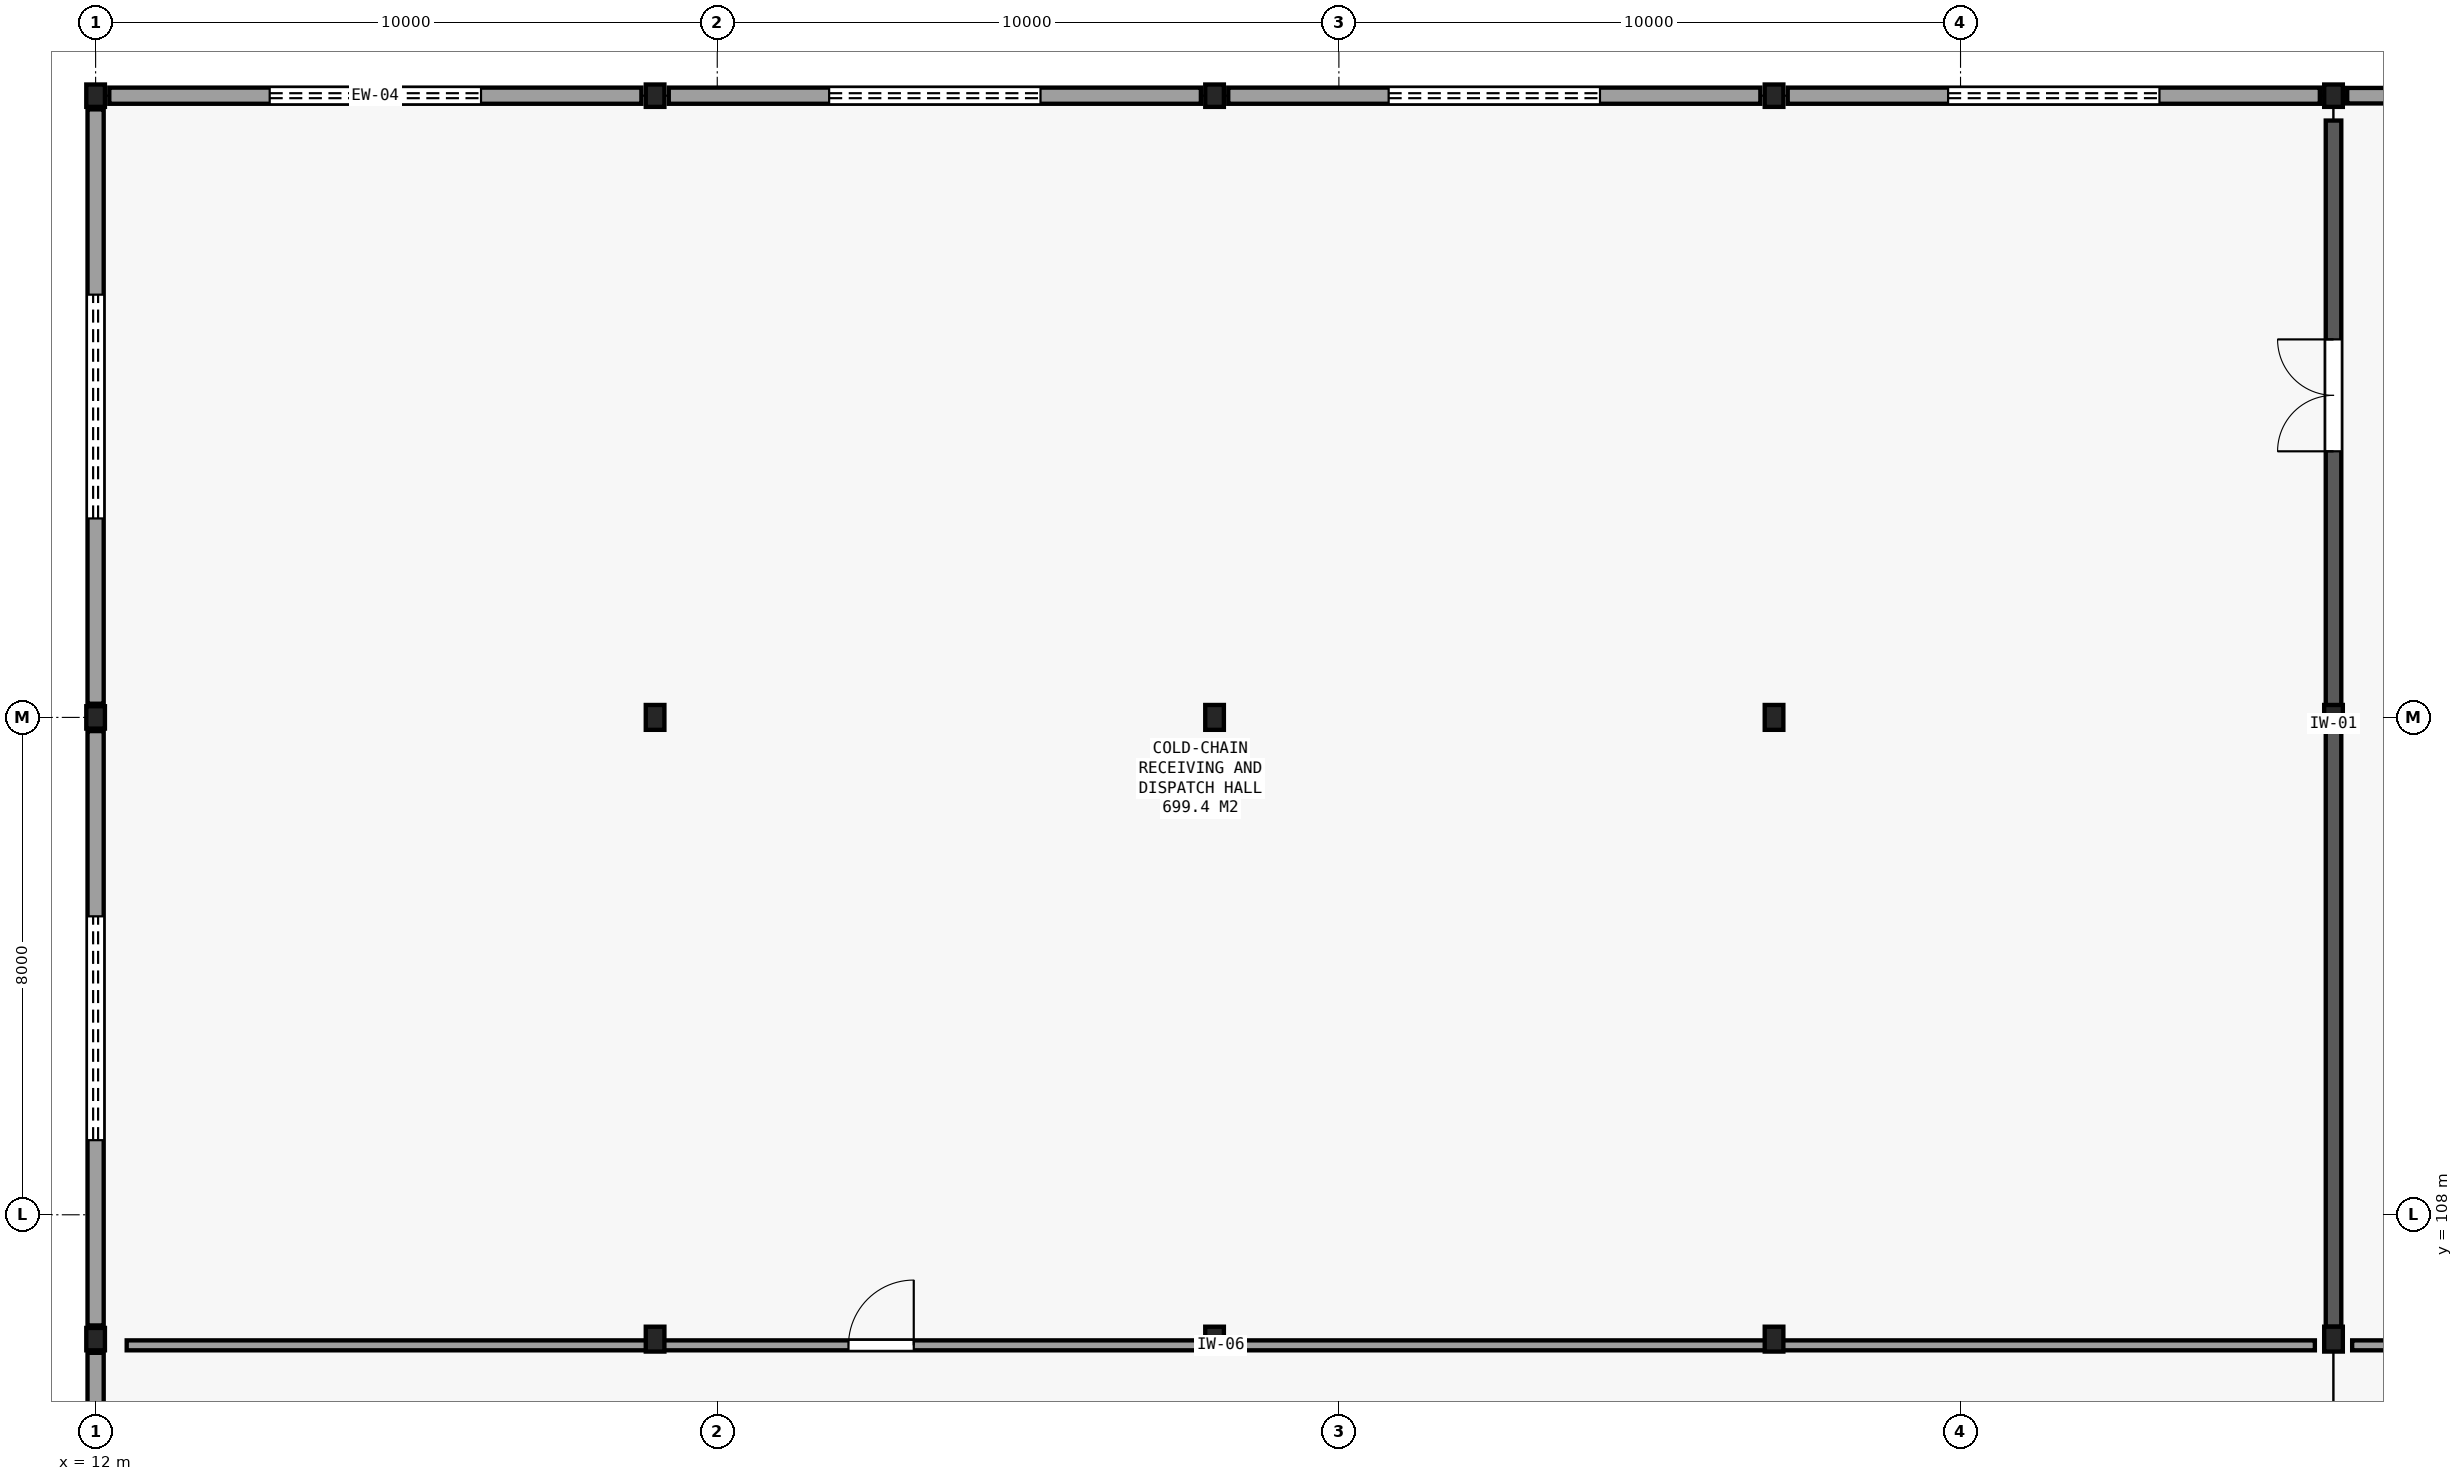
"""IFC4 building model, lengths in metres.
Left out: names, types, materials, properties, quantities, classifications, styles, units other than length and angle.
Written with IfcOpenShell. Run it as: python <this file> out.ifc"""

import sys

from ifc_helpers import new_model, si_unit, direction, frame, frame_2d, origin, origin_2d, place, context, subcontext, project, spatial, rectangle, i_section, extrude, element, fill, save


model = new_model("IFC4")
c1 = context("Model", 3, precision=1e-05, world=origin(), true_north=direction((0.0, 1.0)))
c2 = subcontext(c1, "Body", "Model", "MODEL_VIEW")
j1 = project(units=[si_unit("LENGTHUNIT", "METRE"), si_unit("PLANEANGLEUNIT", "RADIAN")], contexts=[c1])
p1 = place(None, origin())
s1 = spatial("IfcSite", under=j1, at=p1, CompositionType="ELEMENT")
p2 = place(p1, origin())
s2 = spatial("IfcBuilding", under=s1, at=p2, CompositionType="ELEMENT")
p3 = place(p2, origin())
s3 = spatial("IfcBuildingStorey", under=s2, at=p3, CompositionType="ELEMENT", Elevation=0.0)
for number, where, z_axis, x_axis in (
    (1, (12.0, 106.0, 0.0), (0.0, 0.0, 1.0), (1.0, 0.0, 0.0)),
    (2, (12.0, 116.0, 0.0), (0.0, 0.0, 1.0), (1.0, 0.0, 0.0)),
    (3, (12.0, 126.0, 0.0), (0.0, 0.0, 1.0), (1.0, 0.0, 0.0)),
):
    element("IfcColumn", number, at=place(p3, frame(where, z_axis=z_axis, x_axis=x_axis)), inside=s3, PredefinedType="COLUMN", context=c2, shape_type="SweptSolid", body=[
        extrude(i_section(OverallWidth=0.3, OverallDepth=0.36, WebThickness=0.012, FlangeThickness=0.022, FilletRadius=0.027, at=origin_2d()), origin(), (0.0, 0.0, 1.0), 5.4),
    ])
for number, where, z_axis, x_axis in (
    (4, (21.0, 106.0, 0.0), (0.0, 0.0, 1.0), (1.0, 0.0, 0.0)),
    (5, (21.0, 116.0, 0.0), (0.0, 0.0, 1.0), (1.0, 0.0, 0.0)),
):
    element("IfcColumn", number, at=place(p3, frame(where, z_axis=z_axis, x_axis=x_axis)), inside=s3, PredefinedType="COLUMN", context=c2, shape_type="SweptSolid", body=[
        extrude(i_section(OverallWidth=0.3, OverallDepth=0.4, WebThickness=0.013, FlangeThickness=0.024, FilletRadius=0.027, at=origin_2d()), origin(), (0.0, 0.0, 1.0), 5.4),
    ])
p4 = place(p3, frame((21.0, 126.0, 0.0), z_axis=(0.0, 0.0, 1.0), x_axis=(1.0, 0.0, 0.0)))
e6 = element("IfcColumn", 6, at=p4, inside=s3, PredefinedType="COLUMN", context=c2, shape_type="SweptSolid", body=[
    extrude(i_section(OverallWidth=0.3, OverallDepth=0.36, WebThickness=0.012, FlangeThickness=0.022, FilletRadius=0.027, at=origin_2d()), origin(), (0.0, 0.0, 1.0), 5.4),
])
for number, where, z_axis, x_axis in (
    (7, (30.0, 106.0, 0.0), (0.0, 0.0, 1.0), (1.0, 0.0, 0.0)),
    (8, (30.0, 116.0, 0.0), (0.0, 0.0, 1.0), (1.0, 0.0, 0.0)),
):
    element("IfcColumn", number, at=place(p3, frame(where, z_axis=z_axis, x_axis=x_axis)), inside=s3, PredefinedType="COLUMN", context=c2, shape_type="SweptSolid", body=[
        extrude(i_section(OverallWidth=0.3, OverallDepth=0.4, WebThickness=0.013, FlangeThickness=0.024, FilletRadius=0.027, at=origin_2d()), origin(), (0.0, 0.0, 1.0), 5.4),
    ])
p5 = place(p3, frame((30.0, 126.0, 0.0), z_axis=(0.0, 0.0, 1.0), x_axis=(1.0, 0.0, 0.0)))
e9 = element("IfcColumn", 9, at=p5, inside=s3, PredefinedType="COLUMN", context=c2, shape_type="SweptSolid", body=[
    extrude(i_section(OverallWidth=0.3, OverallDepth=0.36, WebThickness=0.012, FlangeThickness=0.022, FilletRadius=0.027, at=origin_2d()), origin(), (0.0, 0.0, 1.0), 5.4),
])
for number, where, z_axis, x_axis in (
    (10, (39.0, 106.0, 0.0), (0.0, 0.0, 1.0), (1.0, 0.0, 0.0)),
    (11, (39.0, 116.0, 0.0), (0.0, 0.0, 1.0), (1.0, 0.0, 0.0)),
):
    element("IfcColumn", number, at=place(p3, frame(where, z_axis=z_axis, x_axis=x_axis)), inside=s3, PredefinedType="COLUMN", context=c2, shape_type="SweptSolid", body=[
        extrude(i_section(OverallWidth=0.3, OverallDepth=0.4, WebThickness=0.013, FlangeThickness=0.024, FilletRadius=0.027, at=origin_2d()), origin(), (0.0, 0.0, 1.0), 5.4),
    ])
p6 = place(p3, frame((39.0, 126.0, 0.0), z_axis=(0.0, 0.0, 1.0), x_axis=(1.0, 0.0, 0.0)))
e12 = element("IfcColumn", 12, at=p6, inside=s3, PredefinedType="COLUMN", context=c2, shape_type="SweptSolid", body=[
    extrude(i_section(OverallWidth=0.3, OverallDepth=0.36, WebThickness=0.012, FlangeThickness=0.022, FilletRadius=0.027, at=origin_2d()), origin(), (0.0, 0.0, 1.0), 5.4),
])
for number, where, z_axis, x_axis in (
    (13, (48.0, 106.0, 0.0), (0.0, 0.0, 1.0), (1.0, 0.0, 0.0)),
    (14, (48.0, 116.0, 0.0), (0.0, 0.0, 1.0), (1.0, 0.0, 0.0)),
):
    element("IfcColumn", number, at=place(p3, frame(where, z_axis=z_axis, x_axis=x_axis)), inside=s3, PredefinedType="COLUMN", context=c2, shape_type="SweptSolid", body=[
        extrude(i_section(OverallWidth=0.3, OverallDepth=0.4, WebThickness=0.013, FlangeThickness=0.024, FilletRadius=0.027, at=origin_2d()), origin(), (0.0, 0.0, 1.0), 5.4),
    ])
p7 = place(p3, frame((48.0, 126.0, 0.0), z_axis=(0.0, 0.0, 1.0), x_axis=(1.0, 0.0, 0.0)))
e15 = element("IfcColumn", 15, at=p7, inside=s3, PredefinedType="COLUMN", context=c2, shape_type="SweptSolid", body=[
    extrude(i_section(OverallWidth=0.3, OverallDepth=0.36, WebThickness=0.012, FlangeThickness=0.022, FilletRadius=0.027, at=origin_2d()), origin(), (0.0, 0.0, 1.0), 5.4),
])
p8 = place(p3, frame((12.22, 126.0, 0.0), z_axis=(0.0, 0.0, 1.0), x_axis=(1.0, 0.0, 0.0)))
e16 = element("IfcWall", 16, at=p8, inside=s3, PredefinedType="SOLIDWALL", context=c2, shape_type="SweptSolid", body=[
    extrude(rectangle(XDim=8.56, YDim=0.26, at=frame_2d((4.28, 0.0))), origin(), (0.0, 0.0, 1.0), 4.61),
])
p9 = place(p8, frame((2.58, 0.0, 0.0)))
e17 = element("IfcOpeningElement", 17, at=p9, cuts=e16, PredefinedType="OPENING", context=c2, shape_type="SweptSolid", body=[
    extrude(rectangle(XDim=3.4, YDim=3.2, at=frame_2d((1.7, 1.6))), frame((0.0, 0.14, 0.0), z_axis=(0.0, -1.0, 0.0), x_axis=(1.0, 0.0, 0.0)), (0.0, 0.0, 1.0), 0.28),
])
p10 = place(p3, frame((21.22, 126.0, 0.0), z_axis=(0.0, 0.0, 1.0), x_axis=(1.0, 0.0, 0.0)))
e18 = element("IfcWall", 18, at=p10, inside=s3, PredefinedType="SOLIDWALL", context=c2, shape_type="SweptSolid", body=[
    extrude(rectangle(XDim=8.56, YDim=0.26, at=frame_2d((4.28, 0.0))), origin(), (0.0, 0.0, 1.0), 4.61),
])
p11 = place(p10, frame((2.58, 0.0, 0.0)))
e19 = element("IfcOpeningElement", 19, at=p11, cuts=e18, PredefinedType="OPENING", context=c2, shape_type="SweptSolid", body=[
    extrude(rectangle(XDim=3.4, YDim=3.2, at=frame_2d((1.7, 1.6))), frame((0.0, 0.14, 0.0), z_axis=(0.0, -1.0, 0.0), x_axis=(1.0, 0.0, 0.0)), (0.0, 0.0, 1.0), 0.28),
])
p12 = place(p3, frame((30.22, 126.0, 0.0), z_axis=(0.0, 0.0, 1.0), x_axis=(1.0, 0.0, 0.0)))
e20 = element("IfcWall", 20, at=p12, inside=s3, PredefinedType="SOLIDWALL", context=c2, shape_type="SweptSolid", body=[
    extrude(rectangle(XDim=8.56, YDim=0.26, at=frame_2d((4.28, 0.0))), origin(), (0.0, 0.0, 1.0), 4.61),
])
p13 = place(p12, frame((2.58, 0.0, 0.0)))
e21 = element("IfcOpeningElement", 21, at=p13, cuts=e20, PredefinedType="OPENING", context=c2, shape_type="SweptSolid", body=[
    extrude(rectangle(XDim=3.4, YDim=3.2, at=frame_2d((1.7, 1.6))), frame((0.0, 0.14, 0.0), z_axis=(0.0, -1.0, 0.0), x_axis=(1.0, 0.0, 0.0)), (0.0, 0.0, 1.0), 0.28),
])
p14 = place(p3, frame((39.22, 126.0, 0.0), z_axis=(0.0, 0.0, 1.0), x_axis=(1.0, 0.0, 0.0)))
e22 = element("IfcWall", 22, at=p14, inside=s3, PredefinedType="SOLIDWALL", context=c2, shape_type="SweptSolid", body=[
    extrude(rectangle(XDim=8.56, YDim=0.26, at=frame_2d((4.28, 0.0))), origin(), (0.0, 0.0, 1.0), 4.61),
])
p15 = place(p14, frame((2.58, 0.0, 0.0)))
e23 = element("IfcOpeningElement", 23, at=p15, cuts=e22, PredefinedType="OPENING", context=c2, shape_type="SweptSolid", body=[
    extrude(rectangle(XDim=3.4, YDim=3.2, at=frame_2d((1.7, 1.6))), frame((0.0, 0.14, 0.0), z_axis=(0.0, -1.0, 0.0), x_axis=(1.0, 0.0, 0.0)), (0.0, 0.0, 1.0), 0.28),
])
p16 = place(p3, frame((48.22, 126.0, 0.0), z_axis=(0.0, 0.0, 1.0), x_axis=(1.0, 0.0, 0.0)))
e24 = element("IfcWall", 24, at=p16, inside=s3, PredefinedType="SOLIDWALL", context=c2, shape_type="SweptSolid", body=[
    extrude(rectangle(XDim=8.56, YDim=0.25, at=frame_2d((4.28, 0.0))), origin(), (0.0, 0.0, 1.0), 4.61),
])
p17 = place(p16, frame((2.68, 0.0, 0.9)))
e25 = element("IfcOpeningElement", 25, at=p17, cuts=e24, PredefinedType="OPENING", context=c2, shape_type="SweptSolid", body=[
    extrude(rectangle(XDim=3.2, YDim=2.2, at=frame_2d((1.6, 1.1))), frame((0.0, 0.135, 0.0), z_axis=(0.0, -1.0, 0.0), x_axis=(1.0, 0.0, 0.0)), (0.0, 0.0, 1.0), 0.27),
])
p18 = place(p3, frame((12.0, 96.22, 0.0), z_axis=(0.0, 0.0, 1.0), x_axis=(0.0, 1.0, 0.0)))
e26 = element("IfcWall", 26, at=p18, inside=s3, PredefinedType="SOLIDWALL", context=c2, shape_type="SweptSolid", body=[
    extrude(rectangle(XDim=9.56, YDim=0.26, at=frame_2d((4.78, 0.0))), origin(), (0.0, 0.0, 1.0), 4.71),
])
p19 = place(p18, frame((4.03, 0.0, 0.0)))
e27 = element("IfcOpeningElement", 27, at=p19, cuts=e26, PredefinedType="OPENING", context=c2, shape_type="SweptSolid", body=[
    extrude(rectangle(XDim=1.5, YDim=2.25, at=frame_2d((0.75, 1.125))), frame((0.0, 0.14, 0.0), z_axis=(0.0, -1.0, 0.0), x_axis=(1.0, 0.0, 0.0)), (0.0, 0.0, 1.0), 0.28),
])
p20 = place(p3, frame((12.0, 106.22, 0.0), z_axis=(0.0, 0.0, 1.0), x_axis=(0.0, 1.0, 0.0)))
e28 = element("IfcWall", 28, at=p20, inside=s3, PredefinedType="SOLIDWALL", context=c2, shape_type="SweptSolid", body=[
    extrude(rectangle(XDim=9.56, YDim=0.26, at=frame_2d((4.78, 0.0))), origin(), (0.0, 0.0, 1.0), 4.71),
])
p21 = place(p20, frame((2.98, 0.0, 0.0)))
e29 = element("IfcOpeningElement", 29, at=p21, cuts=e28, PredefinedType="OPENING", context=c2, shape_type="SweptSolid", body=[
    extrude(rectangle(XDim=3.6, YDim=3.0, at=frame_2d((1.8, 1.5))), frame((0.0, 0.14, 0.0), z_axis=(0.0, -1.0, 0.0), x_axis=(1.0, 0.0, 0.0)), (0.0, 0.0, 1.0), 0.28),
])
p22 = place(p3, frame((12.0, 116.22, 0.0), z_axis=(0.0, 0.0, 1.0), x_axis=(0.0, 1.0, 0.0)))
e30 = element("IfcWall", 30, at=p22, inside=s3, PredefinedType="SOLIDWALL", context=c2, shape_type="SweptSolid", body=[
    extrude(rectangle(XDim=9.56, YDim=0.26, at=frame_2d((4.78, 0.0))), origin(), (0.0, 0.0, 1.0), 4.71),
])
p23 = place(p22, frame((2.98, 0.0, 0.0)))
e31 = element("IfcOpeningElement", 31, at=p23, cuts=e30, PredefinedType="OPENING", context=c2, shape_type="SweptSolid", body=[
    extrude(rectangle(XDim=3.6, YDim=3.0, at=frame_2d((1.8, 1.5))), frame((0.0, 0.14, 0.0), z_axis=(0.0, -1.0, 0.0), x_axis=(1.0, 0.0, 0.0)), (0.0, 0.0, 1.0), 0.28),
])
p24 = place(p3, frame((12.5, 105.9, 0.0), z_axis=(0.0, 0.0, 1.0), x_axis=(1.0, 0.0, 0.0)))
e32 = element("IfcWall", 32, at=p24, inside=s3, PredefinedType="PARTITIONING", context=c2, shape_type="SweptSolid", body=[
    extrude(rectangle(XDim=35.2, YDim=0.16, at=frame_2d((17.6, 0.0))), origin(), (0.0, 0.0, 1.0), 4.61),
])
p25 = place(p24, frame((11.611, 0.0, 0.0)))
e33 = element("IfcOpeningElement", 33, at=p25, cuts=e32, PredefinedType="OPENING", context=c2, shape_type="SweptSolid", body=[
    extrude(rectangle(XDim=1.05, YDim=2.15, at=frame_2d((0.525, 1.075))), frame((0.0, 0.09, 0.0), z_axis=(0.0, -1.0, 0.0), x_axis=(1.0, 0.0, 0.0)), (0.0, 0.0, 1.0), 0.18),
])
p26 = place(p3, frame((48.3, 105.9, 0.0), z_axis=(0.0, 0.0, 1.0), x_axis=(1.0, 0.0, 0.0)))
e34 = element("IfcWall", 34, at=p26, inside=s3, PredefinedType="PARTITIONING", context=c2, shape_type="SweptSolid", body=[
    extrude(rectangle(XDim=26.5, YDim=0.16, at=frame_2d((13.25, 0.0))), origin(), (0.0, 0.0, 1.0), 4.61),
])
p27 = place(p26, frame((12.725, 0.0, 0.0)))
e35 = element("IfcOpeningElement", 35, at=p27, cuts=e34, PredefinedType="OPENING", context=c2, shape_type="SweptSolid", body=[
    extrude(rectangle(XDim=1.05, YDim=2.15, at=frame_2d((0.525, 1.075))), frame((0.0, 0.09, 0.0), z_axis=(0.0, -1.0, 0.0), x_axis=(1.0, 0.0, 0.0)), (0.0, 0.0, 1.0), 0.18),
])
p28 = place(p3, frame((48.0, 106.2, 0.0), z_axis=(0.0, 0.0, 1.0), x_axis=(0.0, 1.0, 0.0)))
e36 = element("IfcWall", 36, at=p28, inside=s3, PredefinedType="SOLIDWALL", context=c2, shape_type="SweptSolid", body=[
    extrude(rectangle(XDim=19.4, YDim=0.25, at=frame_2d((9.7, 0.0))), origin(), (0.0, 0.0, 1.0), 5.08),
])
p29 = place(p28, frame((14.08, 0.0, 0.0)))
e37 = element("IfcOpeningElement", 37, at=p29, cuts=e36, PredefinedType="OPENING", context=c2, shape_type="SweptSolid", body=[
    extrude(rectangle(XDim=1.8, YDim=2.2, at=frame_2d((0.9, 1.1))), frame((0.0, 0.135, 0.0), z_axis=(0.0, -1.0, 0.0), x_axis=(1.0, 0.0, 0.0)), (0.0, 0.0, 1.0), 0.27),
])
p30 = place(p9, origin())
e38 = element("IfcDoor", 38, at=p30, inside=s3, OperationType="ROLLINGUP", PredefinedType="GATE", context=c2, shape_type="SweptSolid", body=[
    extrude(rectangle(XDim=3.4, YDim=3.2, at=frame_2d((1.7, 1.6))), frame((0.0, 0.025, 0.0), z_axis=(0.0, -1.0, 0.0), x_axis=(1.0, 0.0, 0.0)), (0.0, 0.0, 1.0), 0.05),
])
fill(e17, e38)
p31 = place(p11, origin())
e39 = element("IfcDoor", 39, at=p31, inside=s3, OperationType="ROLLINGUP", PredefinedType="GATE", context=c2, shape_type="SweptSolid", body=[
    extrude(rectangle(XDim=3.4, YDim=3.2, at=frame_2d((1.7, 1.6))), frame((0.0, 0.025, 0.0), z_axis=(0.0, -1.0, 0.0), x_axis=(1.0, 0.0, 0.0)), (0.0, 0.0, 1.0), 0.05),
])
fill(e19, e39)
p32 = place(p13, origin())
e40 = element("IfcDoor", 40, at=p32, inside=s3, OperationType="ROLLINGUP", PredefinedType="GATE", context=c2, shape_type="SweptSolid", body=[
    extrude(rectangle(XDim=3.4, YDim=3.2, at=frame_2d((1.7, 1.6))), frame((0.0, 0.025, 0.0), z_axis=(0.0, -1.0, 0.0), x_axis=(1.0, 0.0, 0.0)), (0.0, 0.0, 1.0), 0.05),
])
fill(e21, e40)
p33 = place(p15, origin())
e41 = element("IfcDoor", 41, at=p33, inside=s3, OperationType="ROLLINGUP", PredefinedType="GATE", context=c2, shape_type="SweptSolid", body=[
    extrude(rectangle(XDim=3.4, YDim=3.2, at=frame_2d((1.7, 1.6))), frame((0.0, 0.025, 0.0), z_axis=(0.0, -1.0, 0.0), x_axis=(1.0, 0.0, 0.0)), (0.0, 0.0, 1.0), 0.05),
])
fill(e23, e41)
p34 = place(p21, origin())
e42 = element("IfcDoor", 42, at=p34, inside=s3, OperationType="ROLLINGUP", PredefinedType="GATE", context=c2, shape_type="SweptSolid", body=[
    extrude(rectangle(XDim=3.6, YDim=3.0, at=frame_2d((1.8, 1.5))), frame((0.0, 0.025, 0.0), z_axis=(0.0, -1.0, 0.0), x_axis=(1.0, 0.0, 0.0)), (0.0, 0.0, 1.0), 0.05),
])
fill(e29, e42)
p35 = place(p23, origin())
e43 = element("IfcDoor", 43, at=p35, inside=s3, OperationType="ROLLINGUP", PredefinedType="GATE", context=c2, shape_type="SweptSolid", body=[
    extrude(rectangle(XDim=3.6, YDim=3.0, at=frame_2d((1.8, 1.5))), frame((0.0, 0.025, 0.0), z_axis=(0.0, -1.0, 0.0), x_axis=(1.0, 0.0, 0.0)), (0.0, 0.0, 1.0), 0.05),
])
fill(e31, e43)
p36 = place(p25, origin())
e44 = element("IfcDoor", 44, at=p36, inside=s3, OperationType="SINGLE_SWING_RIGHT", PredefinedType="DOOR", context=c2, shape_type="SweptSolid", body=[
    extrude(rectangle(XDim=1.05, YDim=2.15, at=frame_2d((0.525, 1.075))), frame((0.0, 0.025, 0.0), z_axis=(0.0, -1.0, 0.0), x_axis=(1.0, 0.0, 0.0)), (0.0, 0.0, 1.0), 0.05),
])
fill(e33, e44)
p37 = place(p29, origin())
e45 = element("IfcDoor", 45, at=p37, inside=s3, OperationType="DOUBLE_DOOR_SINGLE_SWING", PredefinedType="DOOR", context=c2, shape_type="SweptSolid", body=[
    extrude(rectangle(XDim=1.8, YDim=2.2, at=frame_2d((0.9, 1.1))), frame((0.0, 0.025, 0.0), z_axis=(0.0, -1.0, 0.0), x_axis=(1.0, 0.0, 0.0)), (0.0, 0.0, 1.0), 0.05),
])
fill(e37, e45)
save(model, sys.argv[1])
